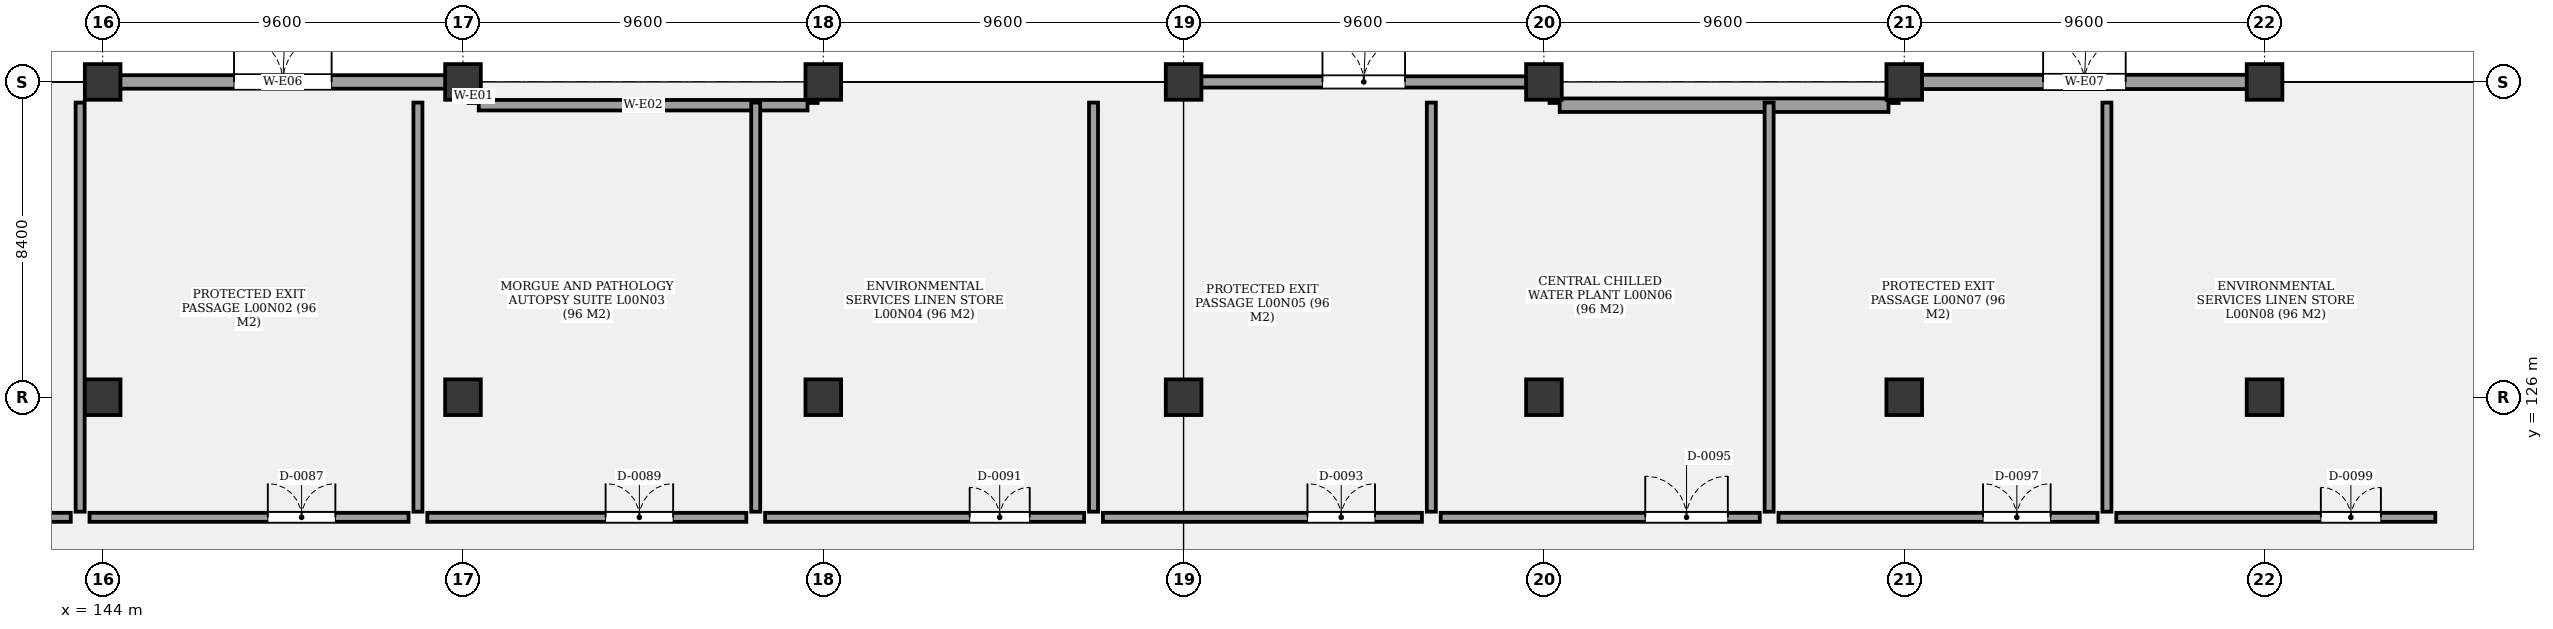
"""IFC4 building model, lengths in metres.
Left out: names, types, materials, properties, quantities, classifications, styles, units other than length and angle.
Written with IfcOpenShell. Run it as: python <this file> out.ifc"""

import sys

from ifc_helpers import new_model, si_unit, direction, frame, frame_2d, origin, origin_2d, place, context, subcontext, project, spatial, rectangle, extrude, element, fill, save


model = new_model("IFC4")
c1 = context("Model", 3, precision=1e-05, world=origin(), true_north=direction((0.0, 1.0)))
c2 = subcontext(c1, "Body", "Model", "MODEL_VIEW")
j1 = project(units=[si_unit("LENGTHUNIT", "METRE"), si_unit("PLANEANGLEUNIT", "RADIAN")], contexts=[c1])
p1 = place(None, origin())
s1 = spatial("IfcSite", under=j1, at=p1, CompositionType="ELEMENT")
p2 = place(p1, origin())
s2 = spatial("IfcBuilding", under=s1, at=p2, CompositionType="ELEMENT")
p3 = place(p2, origin())
s3 = spatial("IfcBuildingStorey", under=s2, at=p3, CompositionType="ELEMENT", Elevation=0.0)
for number, where, z_axis, x_axis in (
    (1, (144.0, 126.0, -0.35), (0.0, 0.0, 1.0), (1.0, 0.0, 0.0)),
    (2, (144.0, 134.4, -0.35), (0.0, 0.0, 1.0), (1.0, 0.0, 0.0)),
    (3, (153.6, 126.0, -0.35), (0.0, 0.0, 1.0), (1.0, 0.0, 0.0)),
    (4, (153.6, 134.4, -0.35), (0.0, 0.0, 1.0), (1.0, 0.0, 0.0)),
    (5, (163.2, 126.0, -0.35), (0.0, 0.0, 1.0), (1.0, 0.0, 0.0)),
    (6, (163.2, 134.4, -0.35), (0.0, 0.0, 1.0), (1.0, 0.0, 0.0)),
    (7, (172.8, 126.0, -0.35), (0.0, 0.0, 1.0), (1.0, 0.0, 0.0)),
    (8, (172.8, 134.4, -0.35), (0.0, 0.0, 1.0), (1.0, 0.0, 0.0)),
    (9, (182.4, 126.0, -0.35), (0.0, 0.0, 1.0), (1.0, 0.0, 0.0)),
    (10, (182.4, 134.4, -0.35), (0.0, 0.0, 1.0), (1.0, 0.0, 0.0)),
    (11, (192.0, 126.0, -0.35), (0.0, 0.0, 1.0), (1.0, 0.0, 0.0)),
    (12, (192.0, 134.4, -0.35), (0.0, 0.0, 1.0), (1.0, 0.0, 0.0)),
    (13, (201.6, 126.0, -0.35), (0.0, 0.0, 1.0), (1.0, 0.0, 0.0)),
    (14, (201.6, 134.4, -0.35), (0.0, 0.0, 1.0), (1.0, 0.0, 0.0)),
):
    element("IfcColumn", number, at=place(p3, frame(where, z_axis=z_axis, x_axis=x_axis)), inside=s3, PredefinedType="COLUMN", context=c2, shape_type="SweptSolid", body=[
        extrude(rectangle(XDim=0.95, YDim=0.95, at=origin_2d()), origin(), (0.0, 0.0, 1.0), 5.45),
    ])
p4 = place(p3, frame((144.0, 134.4, 0.0), z_axis=(0.0, 0.0, 1.0), x_axis=(1.0, 0.0, 0.0)))
e15 = element("IfcWall", 15, at=p4, inside=s3, PredefinedType="SOLIDWALL", context=c2, shape_type="SweptSolid", body=[
    extrude(rectangle(XDim=9.6, YDim=0.36, at=frame_2d((4.8, 0.0))), origin(), (0.0, 0.0, 1.0), 4.24),
])
p5 = place(p4, frame((3.5, 0.0, 0.0)))
e16 = element("IfcOpeningElement", 16, at=p5, cuts=e15, PredefinedType="OPENING", context=c2, shape_type="SweptSolid", body=[
    extrude(rectangle(XDim=2.6, YDim=2.6, at=frame_2d((1.3, 1.3))), frame((0.0, 0.19, 0.0), z_axis=(0.0, -1.0, 0.0), x_axis=(1.0, 0.0, 0.0)), (0.0, 0.0, 1.0), 0.38),
])
for number, where, z_axis, x_axis in (
    (17, (153.88, 134.2, 0.0), (0.0, 0.0, 1.0), (0.0, -1.0, 0.0)),
    (18, (162.92, 134.2, 0.0), (0.0, 0.0, 1.0), (0.0, -1.0, 0.0)),
):
    element("IfcWall", number, at=place(p3, frame(where, z_axis=z_axis, x_axis=x_axis)), inside=s3, PredefinedType="SOLIDWALL", context=c2, shape_type="SweptSolid", body=[
        extrude(rectangle(XDim=0.36, YDim=0.26, at=frame_2d((0.18, 0.0))), origin(), (0.0, 0.0, 1.0), 4.24),
    ])
p6 = place(p3, frame((154.02, 133.78, 0.0), z_axis=(0.0, 0.0, 1.0), x_axis=(1.0, 0.0, 0.0)))
e19 = element("IfcWall", 19, at=p6, inside=s3, PredefinedType="SOLIDWALL", context=c2, shape_type="SweptSolid", body=[
    extrude(rectangle(XDim=8.76, YDim=0.28, at=frame_2d((4.38, 0.0))), origin(), (0.0, 0.0, 1.0), 4.24),
])
p7 = place(p3, frame((172.8, 134.4, 0.0), z_axis=(0.0, 0.0, 1.0), x_axis=(1.0, 0.0, 0.0)))
e20 = element("IfcWall", 20, at=p7, inside=s3, PredefinedType="SOLIDWALL", context=c2, shape_type="SweptSolid", body=[
    extrude(rectangle(XDim=9.6, YDim=0.3, at=frame_2d((4.8, 0.0))), origin(), (0.0, 0.0, 1.0), 4.24),
])
p8 = place(p7, frame((3.7, 0.0, 0.0)))
e21 = element("IfcOpeningElement", 21, at=p8, cuts=e20, PredefinedType="OPENING", context=c2, shape_type="SweptSolid", body=[
    extrude(rectangle(XDim=2.2, YDim=2.5, at=frame_2d((1.1, 1.25))), frame((0.0, 0.16, 0.0), z_axis=(0.0, -1.0, 0.0), x_axis=(1.0, 0.0, 0.0)), (0.0, 0.0, 1.0), 0.32),
])
for number, where, z_axis, x_axis in (
    (22, (182.68, 134.2, 0.0), (0.0, 0.0, 1.0), (0.0, -1.0, 0.0)),
    (23, (191.72, 134.2, 0.0), (0.0, 0.0, 1.0), (0.0, -1.0, 0.0)),
):
    element("IfcWall", number, at=place(p3, frame(where, z_axis=z_axis, x_axis=x_axis)), inside=s3, PredefinedType="SOLIDWALL", context=c2, shape_type="SweptSolid", body=[
        extrude(rectangle(XDim=0.36, YDim=0.26, at=frame_2d((0.18, 0.0))), origin(), (0.0, 0.0, 1.0), 4.24),
    ])
p9 = place(p3, frame((182.82, 133.78, 0.0), z_axis=(0.0, 0.0, 1.0), x_axis=(1.0, 0.0, 0.0)))
e24 = element("IfcWall", 24, at=p9, inside=s3, PredefinedType="SOLIDWALL", context=c2, shape_type="SweptSolid", body=[
    extrude(rectangle(XDim=8.76, YDim=0.36, at=frame_2d((4.38, 0.0))), origin(), (0.0, 0.0, 1.0), 4.24),
])
p10 = place(p3, frame((192.0, 134.4, 0.0), z_axis=(0.0, 0.0, 1.0), x_axis=(1.0, 0.0, 0.0)))
e25 = element("IfcWall", 25, at=p10, inside=s3, PredefinedType="SOLIDWALL", context=c2, shape_type="SweptSolid", body=[
    extrude(rectangle(XDim=9.6, YDim=0.38, at=frame_2d((4.8, 0.0))), origin(), (0.0, 0.0, 1.0), 4.24),
])
p11 = place(p10, frame((3.7, 0.0, 0.0)))
e26 = element("IfcOpeningElement", 26, at=p11, cuts=e25, PredefinedType="OPENING", context=c2, shape_type="SweptSolid", body=[
    extrude(rectangle(XDim=2.2, YDim=2.5, at=frame_2d((1.1, 1.25))), frame((0.0, 0.2, 0.0), z_axis=(0.0, -1.0, 0.0), x_axis=(1.0, 0.0, 0.0)), (0.0, 0.0, 1.0), 0.4),
])
p12 = place(p3, frame((134.65, 122.8, 0.0), z_axis=(0.0, 0.0, 1.0), x_axis=(1.0, 0.0, 0.0)))
e27 = element("IfcWall", 27, at=p12, inside=s3, PredefinedType="PARTITIONING", context=c2, shape_type="SweptSolid", body=[
    extrude(rectangle(XDim=8.5, YDim=0.24, at=frame_2d((4.25, 0.0))), origin(), (0.0, 0.0, 1.0), 3.98),
])
p13 = place(p12, frame((4.75, 0.0, 0.0)))
e28 = element("IfcOpeningElement", 28, at=p13, cuts=e27, PredefinedType="OPENING", context=c2, shape_type="SweptSolid", body=[
    extrude(rectangle(XDim=2.2, YDim=2.4, at=frame_2d((1.1, 1.2))), frame((0.0, 0.13, 0.0), z_axis=(0.0, -1.0, 0.0), x_axis=(1.0, 0.0, 0.0)), (0.0, 0.0, 1.0), 0.26),
])
p14 = place(p3, frame((143.65, 122.8, 0.0), z_axis=(0.0, 0.0, 1.0), x_axis=(1.0, 0.0, 0.0)))
e29 = element("IfcWall", 29, at=p14, inside=s3, PredefinedType="PARTITIONING", context=c2, shape_type="SweptSolid", body=[
    extrude(rectangle(XDim=8.5, YDim=0.24, at=frame_2d((4.25, 0.0))), origin(), (0.0, 0.0, 1.0), 3.98),
])
p15 = place(p14, frame((4.75, 0.0, 0.0)))
e30 = element("IfcOpeningElement", 30, at=p15, cuts=e29, PredefinedType="OPENING", context=c2, shape_type="SweptSolid", body=[
    extrude(rectangle(XDim=1.8, YDim=2.2, at=frame_2d((0.9, 1.1))), frame((0.0, 0.13, 0.0), z_axis=(0.0, -1.0, 0.0), x_axis=(1.0, 0.0, 0.0)), (0.0, 0.0, 1.0), 0.26),
])
p16 = place(p3, frame((143.4, 122.95, 0.0), z_axis=(0.0, 0.0, 1.0), x_axis=(0.0, 1.0, 0.0)))
e31 = element("IfcWall", 31, at=p16, inside=s3, PredefinedType="PARTITIONING", context=c2, shape_type="SweptSolid", body=[
    extrude(rectangle(XDim=10.9, YDim=0.24, at=frame_2d((5.45, 0.0))), origin(), (0.0, 0.0, 1.0), 3.98),
])
p17 = place(p3, frame((152.65, 122.8, 0.0), z_axis=(0.0, 0.0, 1.0), x_axis=(1.0, 0.0, 0.0)))
e32 = element("IfcWall", 32, at=p17, inside=s3, PredefinedType="PARTITIONING", context=c2, shape_type="SweptSolid", body=[
    extrude(rectangle(XDim=8.5, YDim=0.24, at=frame_2d((4.25, 0.0))), origin(), (0.0, 0.0, 1.0), 3.98),
])
p18 = place(p17, frame((4.75, 0.0, 0.0)))
e33 = element("IfcOpeningElement", 33, at=p18, cuts=e32, PredefinedType="OPENING", context=c2, shape_type="SweptSolid", body=[
    extrude(rectangle(XDim=1.8, YDim=2.2, at=frame_2d((0.9, 1.1))), frame((0.0, 0.13, 0.0), z_axis=(0.0, -1.0, 0.0), x_axis=(1.0, 0.0, 0.0)), (0.0, 0.0, 1.0), 0.26),
])
p19 = place(p3, frame((152.4, 122.95, 0.0), z_axis=(0.0, 0.0, 1.0), x_axis=(0.0, 1.0, 0.0)))
e34 = element("IfcWall", 34, at=p19, inside=s3, PredefinedType="PARTITIONING", context=c2, shape_type="SweptSolid", body=[
    extrude(rectangle(XDim=10.9, YDim=0.24, at=frame_2d((5.45, 0.0))), origin(), (0.0, 0.0, 1.0), 3.98),
])
p20 = place(p3, frame((161.65, 122.8, 0.0), z_axis=(0.0, 0.0, 1.0), x_axis=(1.0, 0.0, 0.0)))
e35 = element("IfcWall", 35, at=p20, inside=s3, PredefinedType="PARTITIONING", context=c2, shape_type="SweptSolid", body=[
    extrude(rectangle(XDim=8.5, YDim=0.24, at=frame_2d((4.25, 0.0))), origin(), (0.0, 0.0, 1.0), 3.98),
])
p21 = place(p20, frame((5.45, 0.0, 0.0)))
e36 = element("IfcOpeningElement", 36, at=p21, cuts=e35, PredefinedType="OPENING", context=c2, shape_type="SweptSolid", body=[
    extrude(rectangle(XDim=1.6, YDim=2.2, at=frame_2d((0.8, 1.1))), frame((0.0, 0.13, 0.0), z_axis=(0.0, -1.0, 0.0), x_axis=(1.0, 0.0, 0.0)), (0.0, 0.0, 1.0), 0.26),
])
p22 = place(p3, frame((161.4, 122.95, 0.0), z_axis=(0.0, 0.0, 1.0), x_axis=(0.0, 1.0, 0.0)))
e37 = element("IfcWall", 37, at=p22, inside=s3, PredefinedType="PARTITIONING", context=c2, shape_type="SweptSolid", body=[
    extrude(rectangle(XDim=10.9, YDim=0.24, at=frame_2d((5.45, 0.0))), origin(), (0.0, 0.0, 1.0), 3.98),
])
p23 = place(p3, frame((170.65, 122.8, 0.0), z_axis=(0.0, 0.0, 1.0), x_axis=(1.0, 0.0, 0.0)))
e38 = element("IfcWall", 38, at=p23, inside=s3, PredefinedType="PARTITIONING", context=c2, shape_type="SweptSolid", body=[
    extrude(rectangle(XDim=8.5, YDim=0.24, at=frame_2d((4.25, 0.0))), origin(), (0.0, 0.0, 1.0), 3.98),
])
p24 = place(p23, frame((5.45, 0.0, 0.0)))
e39 = element("IfcOpeningElement", 39, at=p24, cuts=e38, PredefinedType="OPENING", context=c2, shape_type="SweptSolid", body=[
    extrude(rectangle(XDim=1.8, YDim=2.2, at=frame_2d((0.9, 1.1))), frame((0.0, 0.13, 0.0), z_axis=(0.0, -1.0, 0.0), x_axis=(1.0, 0.0, 0.0)), (0.0, 0.0, 1.0), 0.26),
])
p25 = place(p3, frame((170.4, 122.95, 0.0), z_axis=(0.0, 0.0, 1.0), x_axis=(0.0, 1.0, 0.0)))
e40 = element("IfcWall", 40, at=p25, inside=s3, PredefinedType="PARTITIONING", context=c2, shape_type="SweptSolid", body=[
    extrude(rectangle(XDim=10.9, YDim=0.24, at=frame_2d((5.45, 0.0))), origin(), (0.0, 0.0, 1.0), 3.98),
])
p26 = place(p3, frame((179.65, 122.8, 0.0), z_axis=(0.0, 0.0, 1.0), x_axis=(1.0, 0.0, 0.0)))
e41 = element("IfcWall", 41, at=p26, inside=s3, PredefinedType="PARTITIONING", context=c2, shape_type="SweptSolid", body=[
    extrude(rectangle(XDim=8.5, YDim=0.24, at=frame_2d((4.25, 0.0))), origin(), (0.0, 0.0, 1.0), 3.98),
])
p27 = place(p26, frame((5.45, 0.0, 0.0)))
e42 = element("IfcOpeningElement", 42, at=p27, cuts=e41, PredefinedType="OPENING", context=c2, shape_type="SweptSolid", body=[
    extrude(rectangle(XDim=2.2, YDim=2.4, at=frame_2d((1.1, 1.2))), frame((0.0, 0.13, 0.0), z_axis=(0.0, -1.0, 0.0), x_axis=(1.0, 0.0, 0.0)), (0.0, 0.0, 1.0), 0.26),
])
p28 = place(p3, frame((179.4, 122.95, 0.0), z_axis=(0.0, 0.0, 1.0), x_axis=(0.0, 1.0, 0.0)))
e43 = element("IfcWall", 43, at=p28, inside=s3, PredefinedType="PARTITIONING", context=c2, shape_type="SweptSolid", body=[
    extrude(rectangle(XDim=10.9, YDim=0.24, at=frame_2d((5.45, 0.0))), origin(), (0.0, 0.0, 1.0), 3.98),
])
p29 = place(p3, frame((188.65, 122.8, 0.0), z_axis=(0.0, 0.0, 1.0), x_axis=(1.0, 0.0, 0.0)))
e44 = element("IfcWall", 44, at=p29, inside=s3, PredefinedType="PARTITIONING", context=c2, shape_type="SweptSolid", body=[
    extrude(rectangle(XDim=8.5, YDim=0.24, at=frame_2d((4.25, 0.0))), origin(), (0.0, 0.0, 1.0), 3.98),
])
p30 = place(p29, frame((5.45, 0.0, 0.0)))
e45 = element("IfcOpeningElement", 45, at=p30, cuts=e44, PredefinedType="OPENING", context=c2, shape_type="SweptSolid", body=[
    extrude(rectangle(XDim=1.8, YDim=2.2, at=frame_2d((0.9, 1.1))), frame((0.0, 0.13, 0.0), z_axis=(0.0, -1.0, 0.0), x_axis=(1.0, 0.0, 0.0)), (0.0, 0.0, 1.0), 0.26),
])
p31 = place(p3, frame((188.4, 122.95, 0.0), z_axis=(0.0, 0.0, 1.0), x_axis=(0.0, 1.0, 0.0)))
e46 = element("IfcWall", 46, at=p31, inside=s3, PredefinedType="PARTITIONING", context=c2, shape_type="SweptSolid", body=[
    extrude(rectangle(XDim=10.9, YDim=0.24, at=frame_2d((5.45, 0.0))), origin(), (0.0, 0.0, 1.0), 3.98),
])
p32 = place(p3, frame((197.65, 122.8, 0.0), z_axis=(0.0, 0.0, 1.0), x_axis=(1.0, 0.0, 0.0)))
e47 = element("IfcWall", 47, at=p32, inside=s3, PredefinedType="PARTITIONING", context=c2, shape_type="SweptSolid", body=[
    extrude(rectangle(XDim=8.5, YDim=0.24, at=frame_2d((4.25, 0.0))), origin(), (0.0, 0.0, 1.0), 3.98),
])
p33 = place(p32, frame((5.45, 0.0, 0.0)))
e48 = element("IfcOpeningElement", 48, at=p33, cuts=e47, PredefinedType="OPENING", context=c2, shape_type="SweptSolid", body=[
    extrude(rectangle(XDim=1.6, YDim=2.2, at=frame_2d((0.8, 1.1))), frame((0.0, 0.13, 0.0), z_axis=(0.0, -1.0, 0.0), x_axis=(1.0, 0.0, 0.0)), (0.0, 0.0, 1.0), 0.26),
])
p34 = place(p3, frame((197.4, 122.95, 0.0), z_axis=(0.0, 0.0, 1.0), x_axis=(0.0, 1.0, 0.0)))
e49 = element("IfcWall", 49, at=p34, inside=s3, PredefinedType="PARTITIONING", context=c2, shape_type="SweptSolid", body=[
    extrude(rectangle(XDim=10.9, YDim=0.24, at=frame_2d((5.45, 0.0))), origin(), (0.0, 0.0, 1.0), 3.98),
])
p35 = place(p5, origin())
e50 = element("IfcDoor", 50, at=p35, inside=s3, OperationType="DOUBLE_DOOR_SINGLE_SWING", PredefinedType="DOOR", context=c2, shape_type="SweptSolid", body=[
    extrude(rectangle(XDim=2.6, YDim=2.6, at=frame_2d((1.3, 1.3))), frame((0.0, 0.025, 0.0), z_axis=(0.0, -1.0, 0.0), x_axis=(1.0, 0.0, 0.0)), (0.0, 0.0, 1.0), 0.05),
])
fill(e16, e50)
p36 = place(p8, origin())
e51 = element("IfcDoor", 51, at=p36, inside=s3, OperationType="DOUBLE_DOOR_SINGLE_SWING", PredefinedType="DOOR", context=c2, shape_type="SweptSolid", body=[
    extrude(rectangle(XDim=2.2, YDim=2.5, at=frame_2d((1.1, 1.25))), frame((0.0, 0.025, 0.0), z_axis=(0.0, -1.0, 0.0), x_axis=(1.0, 0.0, 0.0)), (0.0, 0.0, 1.0), 0.05),
])
fill(e21, e51)
p37 = place(p11, origin())
e52 = element("IfcDoor", 52, at=p37, inside=s3, OperationType="DOUBLE_DOOR_SINGLE_SWING", PredefinedType="DOOR", context=c2, shape_type="SweptSolid", body=[
    extrude(rectangle(XDim=2.2, YDim=2.5, at=frame_2d((1.1, 1.25))), frame((0.0, 0.025, 0.0), z_axis=(0.0, -1.0, 0.0), x_axis=(1.0, 0.0, 0.0)), (0.0, 0.0, 1.0), 0.05),
])
fill(e26, e52)
p38 = place(p15, origin())
e53 = element("IfcDoor", 53, at=p38, inside=s3, OperationType="DOUBLE_DOOR_SINGLE_SWING", PredefinedType="DOOR", context=c2, shape_type="SweptSolid", body=[
    extrude(rectangle(XDim=1.8, YDim=2.2, at=frame_2d((0.9, 1.1))), frame((0.0, 0.025, 0.0), z_axis=(0.0, -1.0, 0.0), x_axis=(1.0, 0.0, 0.0)), (0.0, 0.0, 1.0), 0.05),
])
fill(e30, e53)
p39 = place(p18, origin())
e54 = element("IfcDoor", 54, at=p39, inside=s3, OperationType="DOUBLE_DOOR_SINGLE_SWING", PredefinedType="DOOR", context=c2, shape_type="SweptSolid", body=[
    extrude(rectangle(XDim=1.8, YDim=2.2, at=frame_2d((0.9, 1.1))), frame((0.0, 0.025, 0.0), z_axis=(0.0, -1.0, 0.0), x_axis=(1.0, 0.0, 0.0)), (0.0, 0.0, 1.0), 0.05),
])
fill(e33, e54)
p40 = place(p21, origin())
e55 = element("IfcDoor", 55, at=p40, inside=s3, OperationType="DOUBLE_DOOR_SINGLE_SWING", PredefinedType="DOOR", context=c2, shape_type="SweptSolid", body=[
    extrude(rectangle(XDim=1.6, YDim=2.2, at=frame_2d((0.8, 1.1))), frame((0.0, 0.025, 0.0), z_axis=(0.0, -1.0, 0.0), x_axis=(1.0, 0.0, 0.0)), (0.0, 0.0, 1.0), 0.05),
])
fill(e36, e55)
p41 = place(p24, origin())
e56 = element("IfcDoor", 56, at=p41, inside=s3, OperationType="DOUBLE_DOOR_SINGLE_SWING", PredefinedType="DOOR", context=c2, shape_type="SweptSolid", body=[
    extrude(rectangle(XDim=1.8, YDim=2.2, at=frame_2d((0.9, 1.1))), frame((0.0, 0.025, 0.0), z_axis=(0.0, -1.0, 0.0), x_axis=(1.0, 0.0, 0.0)), (0.0, 0.0, 1.0), 0.05),
])
fill(e39, e56)
p42 = place(p27, origin())
e57 = element("IfcDoor", 57, at=p42, inside=s3, OperationType="DOUBLE_DOOR_SINGLE_SWING", PredefinedType="DOOR", context=c2, shape_type="SweptSolid", body=[
    extrude(rectangle(XDim=2.2, YDim=2.4, at=frame_2d((1.1, 1.2))), frame((0.0, 0.025, 0.0), z_axis=(0.0, -1.0, 0.0), x_axis=(1.0, 0.0, 0.0)), (0.0, 0.0, 1.0), 0.05),
])
fill(e42, e57)
p43 = place(p30, origin())
e58 = element("IfcDoor", 58, at=p43, inside=s3, OperationType="DOUBLE_DOOR_SINGLE_SWING", PredefinedType="DOOR", context=c2, shape_type="SweptSolid", body=[
    extrude(rectangle(XDim=1.8, YDim=2.2, at=frame_2d((0.9, 1.1))), frame((0.0, 0.025, 0.0), z_axis=(0.0, -1.0, 0.0), x_axis=(1.0, 0.0, 0.0)), (0.0, 0.0, 1.0), 0.05),
])
fill(e45, e58)
p44 = place(p33, origin())
e59 = element("IfcDoor", 59, at=p44, inside=s3, OperationType="DOUBLE_DOOR_SINGLE_SWING", PredefinedType="DOOR", context=c2, shape_type="SweptSolid", body=[
    extrude(rectangle(XDim=1.6, YDim=2.2, at=frame_2d((0.8, 1.1))), frame((0.0, 0.025, 0.0), z_axis=(0.0, -1.0, 0.0), x_axis=(1.0, 0.0, 0.0)), (0.0, 0.0, 1.0), 0.05),
])
fill(e48, e59)
save(model, sys.argv[1])
